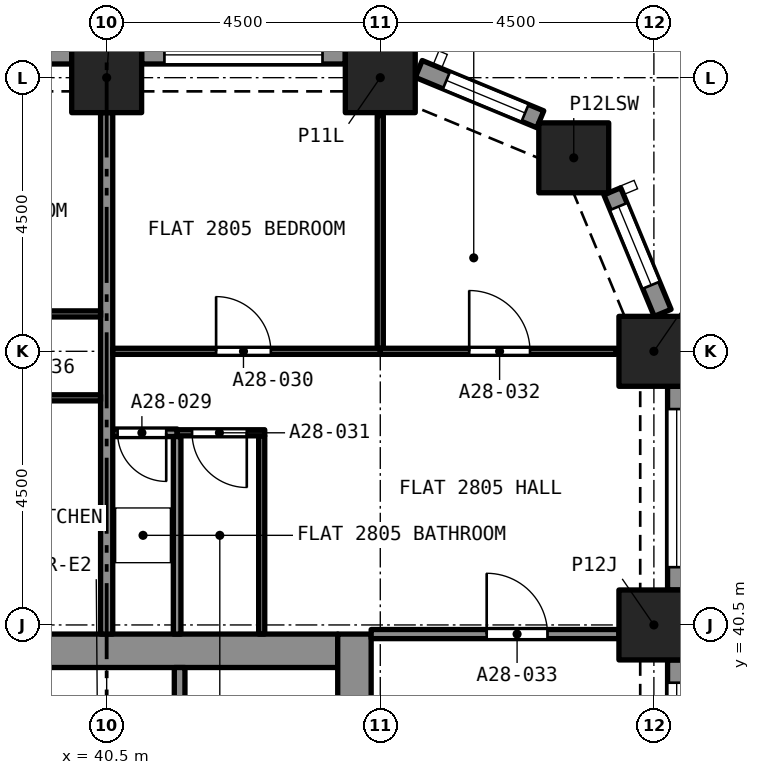
"""IFC4 building model, lengths in metres.
Left out: names, types, materials, properties, quantities, classifications, styles, units other than length and angle.
Written with IfcOpenShell. Run it as: python <this file> out.ifc"""

import sys

from ifc_helpers import new_model, si_unit, direction, frame, frame_2d, origin, origin_2d, place, context, subcontext, project, spatial, rectangle, extrude, element, fill, save


model = new_model("IFC4")
c1 = context("Model", 3, precision=1e-05, world=origin(), true_north=direction((0.0, 1.0)))
c2 = subcontext(c1, "Body", "Model", "MODEL_VIEW")
j1 = project(units=[si_unit("LENGTHUNIT", "METRE"), si_unit("PLANEANGLEUNIT", "RADIAN")], contexts=[c1])
p1 = place(None, origin())
s1 = spatial("IfcSite", under=j1, at=p1, CompositionType="ELEMENT")
p2 = place(p1, origin())
s2 = spatial("IfcBuilding", under=s1, at=p2, CompositionType="ELEMENT")
p3 = place(p2, frame((0.0, 0.0, 102.4)))
s3 = spatial("IfcBuildingStorey", under=s2, at=p3, CompositionType="ELEMENT", Elevation=102.4)
for number, where, z_axis, x_axis in (
    (1, (49.5, 40.5, 0.0), (0.0, 0.0, 1.0), (1.0, 0.0, 0.0)),
    (2, (49.5, 45.0, 0.0), (0.0, 0.0, 1.0), (1.0, 0.0, 0.0)),
    (3, (48.182, 48.182, 0.0), (0.0, 0.0, 1.0), (1.0, 0.0, 0.0)),
    (4, (40.5, 49.5, 0.0), (0.0, 0.0, 1.0), (1.0, 0.0, 0.0)),
    (5, (45.0, 49.5, 0.0), (0.0, 0.0, 1.0), (1.0, 0.0, 0.0)),
):
    element("IfcColumn", number, at=place(p3, frame(where, z_axis=z_axis, x_axis=x_axis)), inside=s3, PredefinedType="COLUMN", context=c2, shape_type="SweptSolid", body=[
        extrude(rectangle(XDim=1.15, YDim=1.15, at=origin_2d()), origin(), (0.0, 0.0, 1.0), 3.2),
    ])
p4 = place(p3, frame((36.7, 40.075, 0.0), z_axis=(0.0, 0.0, 1.0), x_axis=(1.0, 0.0, 0.0)))
e6 = element("IfcWall", 6, at=p4, inside=s3, PredefinedType="SOLIDWALL", context=c2, shape_type="SweptSolid", body=[
    extrude(rectangle(XDim=7.6, YDim=0.55, at=frame_2d((3.8, 0.0))), origin(), (0.0, 0.0, 1.0), 3.2),
])
p5 = place(p3, frame((44.575, 27.15, 0.0), z_axis=(0.0, 0.0, 1.0), x_axis=(0.0, 1.0, 0.0)))
e7 = element("IfcWall", 7, at=p5, inside=s3, PredefinedType="SOLIDWALL", context=c2, shape_type="SweptSolid", body=[
    extrude(rectangle(XDim=13.2, YDim=0.55, at=frame_2d((6.6, 0.0))), origin(), (0.0, 0.0, 1.0), 3.2),
])
p6 = place(p5, frame((8.8, 0.0, 0.0)))
e8 = element("IfcOpeningElement", 8, at=p6, cuts=e7, PredefinedType="OPENING", context=c2, shape_type="SweptSolid", body=[
    extrude(rectangle(XDim=1.2, YDim=2.1, at=frame_2d((0.6, 1.05))), frame((0.0, 0.285, 0.0), z_axis=(0.0, -1.0, 0.0), x_axis=(1.0, 0.0, 0.0)), (0.0, 0.0, 1.0), 0.57),
])
p7 = place(p3, frame((49.875, 39.925, 0.0), z_axis=(0.0, 0.0, 1.0), x_axis=(0.0, -1.0, 0.0)))
e9 = element("IfcWall", 9, at=p7, inside=s3, PredefinedType="SOLIDWALL", context=c2, shape_type="SweptSolid", body=[
    extrude(rectangle(XDim=3.35, YDim=0.3, at=frame_2d((1.675, 0.0))), origin(), (0.0, 0.0, 1.0), 3.2),
])
p8 = place(p7, frame((0.375, 0.0, 0.45)))
e10 = element("IfcOpeningElement", 10, at=p8, cuts=e9, PredefinedType="OPENING", context=c2, shape_type="SweptSolid", body=[
    extrude(rectangle(XDim=2.6, YDim=1.95, at=frame_2d((1.3, 0.975))), frame((0.0, 0.16, 0.0), z_axis=(0.0, -1.0, 0.0), x_axis=(1.0, 0.0, 0.0)), (0.0, 0.0, 1.0), 0.32),
])
p9 = place(p3, frame((49.875, 44.425, 0.0), z_axis=(0.0, 0.0, 1.0), x_axis=(0.0, -1.0, 0.0)))
e11 = element("IfcWall", 11, at=p9, inside=s3, PredefinedType="SOLIDWALL", context=c2, shape_type="SweptSolid", body=[
    extrude(rectangle(XDim=3.35, YDim=0.3, at=frame_2d((1.675, 0.0))), origin(), (0.0, 0.0, 1.0), 3.2),
])
p10 = place(p9, frame((0.375, 0.0, 0.45)))
e12 = element("IfcOpeningElement", 12, at=p10, cuts=e11, PredefinedType="OPENING", context=c2, shape_type="SweptSolid", body=[
    extrude(rectangle(XDim=2.6, YDim=1.95, at=frame_2d((1.3, 0.975))), frame((0.0, 0.16, 0.0), z_axis=(0.0, -1.0, 0.0), x_axis=(1.0, 0.0, 0.0)), (0.0, 0.0, 1.0), 0.32),
])
p11 = place(p3, frame((48.816, 47.631, 0.0), z_axis=(0.0, 0.0, 1.0), x_axis=(0.382723818695, -0.923862802911, 0.0)))
e13 = element("IfcWall", 13, at=p11, inside=s3, PredefinedType="SOLIDWALL", context=c2, shape_type="SweptSolid", body=[
    extrude(rectangle(XDim=2.164, YDim=0.3, at=frame_2d((1.082, 0.0))), origin(), (0.0, 0.0, 1.0), 3.2),
])
p12 = place(p11, frame((0.271, 0.0, 0.45)))
e14 = element("IfcOpeningElement", 14, at=p12, cuts=e13, PredefinedType="OPENING", context=c2, shape_type="SweptSolid", body=[
    extrude(rectangle(XDim=1.4, YDim=1.95, at=frame_2d((0.7, 0.975))), frame((0.0, 0.16, 0.0), z_axis=(0.0, -1.0, 0.0), x_axis=(1.0, 0.0, 0.0)), (0.0, 0.0, 1.0), 0.32),
])
p13 = place(p3, frame((45.632, 49.644, 0.0), z_axis=(0.0, 0.0, 1.0), x_axis=(0.923862802911, -0.382723818695, 0.0)))
e15 = element("IfcWall", 15, at=p13, inside=s3, PredefinedType="SOLIDWALL", context=c2, shape_type="SweptSolid", body=[
    extrude(rectangle(XDim=2.164, YDim=0.3, at=frame_2d((1.082, 0.0))), origin(), (0.0, 0.0, 1.0), 3.2),
])
p14 = place(p13, frame((0.493, 0.0, 0.45)))
e16 = element("IfcOpeningElement", 16, at=p14, cuts=e15, PredefinedType="OPENING", context=c2, shape_type="SweptSolid", body=[
    extrude(rectangle(XDim=1.4, YDim=1.95, at=frame_2d((0.7, 0.975))), frame((0.0, 0.16, 0.0), z_axis=(0.0, -1.0, 0.0), x_axis=(1.0, 0.0, 0.0)), (0.0, 0.0, 1.0), 0.32),
])
p15 = place(p3, frame((41.075, 49.875, 0.0), z_axis=(0.0, 0.0, 1.0), x_axis=(1.0, 0.0, 0.0)))
e17 = element("IfcWall", 17, at=p15, inside=s3, PredefinedType="SOLIDWALL", context=c2, shape_type="SweptSolid", body=[
    extrude(rectangle(XDim=3.35, YDim=0.3, at=frame_2d((1.675, 0.0))), origin(), (0.0, 0.0, 1.0), 3.2),
])
p16 = place(p15, frame((0.375, 0.0, 0.45)))
e18 = element("IfcOpeningElement", 18, at=p16, cuts=e17, PredefinedType="OPENING", context=c2, shape_type="SweptSolid", body=[
    extrude(rectangle(XDim=2.6, YDim=1.95, at=frame_2d((1.3, 0.975))), frame((0.0, 0.16, 0.0), z_axis=(0.0, -1.0, 0.0), x_axis=(1.0, 0.0, 0.0)), (0.0, 0.0, 1.0), 0.32),
])
p17 = place(p3, frame((36.575, 49.875, 0.0), z_axis=(0.0, 0.0, 1.0), x_axis=(1.0, 0.0, 0.0)))
e19 = element("IfcWall", 19, at=p17, inside=s3, PredefinedType="SOLIDWALL", context=c2, shape_type="SweptSolid", body=[
    extrude(rectangle(XDim=3.35, YDim=0.3, at=frame_2d((1.675, 0.0))), origin(), (0.0, 0.0, 1.0), 3.2),
])
p18 = place(p17, frame((0.375, 0.0, 0.45)))
e20 = element("IfcOpeningElement", 20, at=p18, cuts=e19, PredefinedType="OPENING", context=c2, shape_type="SweptSolid", body=[
    extrude(rectangle(XDim=2.6, YDim=1.95, at=frame_2d((1.3, 0.975))), frame((0.0, 0.16, 0.0), z_axis=(0.0, -1.0, 0.0), x_axis=(1.0, 0.0, 0.0)), (0.0, 0.0, 1.0), 0.32),
])
p19 = place(p3, frame((41.659, 43.66, 0.0), z_axis=(0.0, 0.0, 1.0), x_axis=(-1.0, 0.0, 0.0)))
e21 = element("IfcWall", 21, at=p19, inside=s3, PredefinedType="PARTITIONING", context=c2, shape_type="SweptSolid", body=[
    extrude(rectangle(XDim=1.059, YDim=0.125, at=frame_2d((0.53, 0.0))), origin(), (0.0, 0.0, 1.0), 2.9),
])
p20 = place(p19, frame((0.179, 0.0, 0.0)))
e22 = element("IfcOpeningElement", 22, at=p20, cuts=e21, PredefinedType="OPENING", context=c2, shape_type="SweptSolid", body=[
    extrude(rectangle(XDim=0.8, YDim=2.1, at=frame_2d((0.4, 1.05))), frame((0.0, 0.073, 0.0), z_axis=(0.0, -1.0, 0.0), x_axis=(1.0, 0.0, 0.0)), (0.0, 0.0, 1.0), 0.145),
])
p21 = place(p3, frame((41.659, 40.35, 0.0), z_axis=(0.0, 0.0, 1.0), x_axis=(0.0, 1.0, 0.0)))
e23 = element("IfcWall", 23, at=p21, inside=s3, PredefinedType="PARTITIONING", context=c2, shape_type="SweptSolid", body=[
    extrude(rectangle(XDim=3.247, YDim=0.125, at=frame_2d((1.624, 0.0))), origin(), (0.0, 0.0, 1.0), 2.9),
])
p22 = place(p3, frame((40.5, 40.35, 0.0), z_axis=(0.0, 0.0, 1.0), x_axis=(0.0, 1.0, 0.0)))
e24 = element("IfcWall", 24, at=p22, inside=s3, PredefinedType="PARTITIONING", context=c2, shape_type="SweptSolid", body=[
    extrude(rectangle(XDim=8.575, YDim=0.2, at=frame_2d((4.288, 0.0))), origin(), (0.0, 0.0, 1.0), 2.9),
])
p23 = place(p3, frame((40.6, 45.0, 0.0), z_axis=(0.0, 0.0, 1.0), x_axis=(1.0, 0.0, 0.0)))
e25 = element("IfcWall", 25, at=p23, inside=s3, PredefinedType="PARTITIONING", context=c2, shape_type="SweptSolid", body=[
    extrude(rectangle(XDim=4.4, YDim=0.1, at=frame_2d((2.2, 0.0))), origin(), (0.0, 0.0, 1.0), 2.9),
])
p24 = place(p23, frame((1.7, 0.0, 0.0)))
e26 = element("IfcOpeningElement", 26, at=p24, cuts=e25, PredefinedType="OPENING", context=c2, shape_type="SweptSolid", body=[
    extrude(rectangle(XDim=0.9, YDim=2.1, at=frame_2d((0.45, 1.05))), frame((0.0, 0.06, 0.0), z_axis=(0.0, -1.0, 0.0), x_axis=(1.0, 0.0, 0.0)), (0.0, 0.0, 1.0), 0.12),
])
p25 = place(p3, frame((45.0, 45.05, 0.0), z_axis=(0.0, 0.0, 1.0), x_axis=(0.0, 1.0, 0.0)))
e27 = element("IfcWall", 27, at=p25, inside=s3, PredefinedType="PARTITIONING", context=c2, shape_type="SweptSolid", body=[
    extrude(rectangle(XDim=3.828, YDim=0.1, at=frame_2d((1.914, 0.0))), origin(), (0.0, 0.0, 1.0), 2.9),
])
p26 = place(p3, frame((43.05, 40.35, 0.0), z_axis=(0.0, 0.0, 1.0), x_axis=(0.0, 1.0, 0.0)))
e28 = element("IfcWall", 28, at=p26, inside=s3, PredefinedType="PARTITIONING", context=c2, shape_type="SweptSolid", body=[
    extrude(rectangle(XDim=3.26, YDim=0.1, at=frame_2d((1.63, 0.0))), origin(), (0.0, 0.0, 1.0), 2.9),
])
p27 = place(p3, frame((43.1, 43.66, 0.0), z_axis=(0.0, 0.0, 1.0), x_axis=(-1.0, 0.0, 0.0)))
e29 = element("IfcWall", 29, at=p27, inside=s3, PredefinedType="PARTITIONING", context=c2, shape_type="SweptSolid", body=[
    extrude(rectangle(XDim=1.441, YDim=0.1, at=frame_2d((0.72, 0.0))), origin(), (0.0, 0.0, 1.0), 2.9),
])
p28 = place(p27, frame((0.295, 0.0, 0.0)))
e30 = element("IfcOpeningElement", 30, at=p28, cuts=e29, PredefinedType="OPENING", context=c2, shape_type="SweptSolid", body=[
    extrude(rectangle(XDim=0.9, YDim=2.1, at=frame_2d((0.45, 1.05))), frame((0.0, 0.06, 0.0), z_axis=(0.0, -1.0, 0.0), x_axis=(1.0, 0.0, 0.0)), (0.0, 0.0, 1.0), 0.12),
])
p29 = place(p3, frame((45.0, 45.0, 0.0), z_axis=(0.0, 0.0, 1.0), x_axis=(1.0, 0.0, 0.0)))
e31 = element("IfcWall", 31, at=p29, inside=s3, PredefinedType="PARTITIONING", context=c2, shape_type="SweptSolid", body=[
    extrude(rectangle(XDim=3.878, YDim=0.1, at=frame_2d((1.939, 0.0))), origin(), (0.0, 0.0, 1.0), 2.9),
])
p30 = place(p29, frame((1.462, 0.0, 0.0)))
e32 = element("IfcOpeningElement", 32, at=p30, cuts=e31, PredefinedType="OPENING", context=c2, shape_type="SweptSolid", body=[
    extrude(rectangle(XDim=1.0, YDim=2.1, at=frame_2d((0.5, 1.05))), frame((0.0, 0.06, 0.0), z_axis=(0.0, -1.0, 0.0), x_axis=(1.0, 0.0, 0.0)), (0.0, 0.0, 1.0), 0.12),
])
p31 = place(p3, frame((44.85, 40.35, 0.0), z_axis=(0.0, 0.0, 1.0), x_axis=(1.0, 0.0, 0.0)))
e33 = element("IfcWall", 33, at=p31, inside=s3, PredefinedType="PARTITIONING", context=c2, shape_type="SweptSolid", body=[
    extrude(rectangle(XDim=4.075, YDim=0.15, at=frame_2d((2.038, 0.0))), origin(), (0.0, 0.0, 1.0), 2.9),
])
p32 = place(p31, frame((1.9, 0.0, 0.0)))
e34 = element("IfcOpeningElement", 34, at=p32, cuts=e33, PredefinedType="OPENING", context=c2, shape_type="SweptSolid", body=[
    extrude(rectangle(XDim=1.0, YDim=2.1, at=frame_2d((0.5, 1.05))), frame((0.0, 0.085, 0.0), z_axis=(0.0, -1.0, 0.0), x_axis=(1.0, 0.0, 0.0)), (0.0, 0.0, 1.0), 0.17),
])
p33 = place(p3, frame((36.0, 45.615, 0.0), z_axis=(0.0, 0.0, 1.0), x_axis=(1.0, 0.0, 0.0)))
e35 = element("IfcWall", 35, at=p33, inside=s3, PredefinedType="PARTITIONING", context=c2, shape_type="SweptSolid", body=[
    extrude(rectangle(XDim=4.4, YDim=0.1, at=frame_2d((2.2, 0.0))), origin(), (0.0, 0.0, 1.0), 2.9),
])
p34 = place(p33, frame((1.8, 0.0, 0.0)))
e36 = element("IfcOpeningElement", 36, at=p34, cuts=e35, PredefinedType="OPENING", context=c2, shape_type="SweptSolid", body=[
    extrude(rectangle(XDim=0.9, YDim=2.1, at=frame_2d((0.45, 1.05))), frame((0.0, 0.06, 0.0), z_axis=(0.0, -1.0, 0.0), x_axis=(1.0, 0.0, 0.0)), (0.0, 0.0, 1.0), 0.12),
])
p35 = place(p3, frame((40.4, 44.235, 0.0), z_axis=(0.0, 0.0, 1.0), x_axis=(-1.0, 0.0, 0.0)))
e37 = element("IfcWall", 37, at=p35, inside=s3, PredefinedType="PARTITIONING", context=c2, shape_type="SweptSolid", body=[
    extrude(rectangle(XDim=3.25, YDim=0.1, at=frame_2d((1.625, 0.0))), origin(), (0.0, 0.0, 1.0), 2.9),
])
p36 = place(p35, frame((1.125, 0.0, 0.0)))
e38 = element("IfcOpeningElement", 38, at=p36, cuts=e37, PredefinedType="OPENING", context=c2, shape_type="SweptSolid", body=[
    extrude(rectangle(XDim=0.9, YDim=2.1, at=frame_2d((0.45, 1.05))), frame((0.0, 0.06, 0.0), z_axis=(0.0, -1.0, 0.0), x_axis=(1.0, 0.0, 0.0)), (0.0, 0.0, 1.0), 0.12),
])
p37 = place(p3, frame((41.7, 37.5, 0.0), z_axis=(0.0, 0.0, 1.0), x_axis=(0.0, 1.0, 0.0)))
e39 = element("IfcWall", 39, at=p37, inside=s3, PredefinedType="SOLIDWALL", context=c2, shape_type="SweptSolid", body=[
    extrude(rectangle(XDim=2.3, YDim=0.175, at=frame_2d((1.15, 0.0))), origin(), (0.0, 0.0, 1.0), 2.9),
])
p38 = place(p8, origin())
e40 = element("IfcWindow", 40, at=p38, inside=s3, PartitioningType="SINGLE_PANEL", PredefinedType="WINDOW", context=c2, shape_type="SweptSolid", body=[
    extrude(rectangle(XDim=2.6, YDim=1.95, at=frame_2d((1.3, 0.975))), frame((0.0, 0.03, 0.0), z_axis=(0.0, -1.0, 0.0), x_axis=(1.0, 0.0, 0.0)), (0.0, 0.0, 1.0), 0.06),
])
fill(e10, e40)
p39 = place(p10, origin())
e41 = element("IfcWindow", 41, at=p39, inside=s3, PartitioningType="SINGLE_PANEL", PredefinedType="WINDOW", context=c2, shape_type="SweptSolid", body=[
    extrude(rectangle(XDim=2.6, YDim=1.95, at=frame_2d((1.3, 0.975))), frame((0.0, 0.03, 0.0), z_axis=(0.0, -1.0, 0.0), x_axis=(1.0, 0.0, 0.0)), (0.0, 0.0, 1.0), 0.06),
])
fill(e12, e41)
p40 = place(p12, origin())
e42 = element("IfcWindow", 42, at=p40, inside=s3, PartitioningType="SINGLE_PANEL", PredefinedType="WINDOW", context=c2, shape_type="SweptSolid", body=[
    extrude(rectangle(XDim=1.4, YDim=1.95, at=frame_2d((0.7, 0.975))), frame((0.0, 0.03, 0.0), z_axis=(0.0, -1.0, 0.0), x_axis=(1.0, 0.0, 0.0)), (0.0, 0.0, 1.0), 0.06),
])
fill(e14, e42)
p41 = place(p14, origin())
e43 = element("IfcWindow", 43, at=p41, inside=s3, PartitioningType="SINGLE_PANEL", PredefinedType="WINDOW", context=c2, shape_type="SweptSolid", body=[
    extrude(rectangle(XDim=1.4, YDim=1.95, at=frame_2d((0.7, 0.975))), frame((0.0, 0.03, 0.0), z_axis=(0.0, -1.0, 0.0), x_axis=(1.0, 0.0, 0.0)), (0.0, 0.0, 1.0), 0.06),
])
fill(e16, e43)
p42 = place(p16, origin())
e44 = element("IfcWindow", 44, at=p42, inside=s3, PartitioningType="SINGLE_PANEL", PredefinedType="WINDOW", context=c2, shape_type="SweptSolid", body=[
    extrude(rectangle(XDim=2.6, YDim=1.95, at=frame_2d((1.3, 0.975))), frame((0.0, 0.03, 0.0), z_axis=(0.0, -1.0, 0.0), x_axis=(1.0, 0.0, 0.0)), (0.0, 0.0, 1.0), 0.06),
])
fill(e18, e44)
p43 = place(p20, origin())
e45 = element("IfcDoor", 45, at=p43, inside=s3, OperationType="SINGLE_SWING_RIGHT", PredefinedType="DOOR", context=c2, shape_type="SweptSolid", body=[
    extrude(rectangle(XDim=0.8, YDim=2.1, at=frame_2d((0.4, 1.05))), frame((0.0, 0.025, 0.0), z_axis=(0.0, -1.0, 0.0), x_axis=(1.0, 0.0, 0.0)), (0.0, 0.0, 1.0), 0.05),
])
fill(e22, e45)
p44 = place(p24, origin())
e46 = element("IfcDoor", 46, at=p44, inside=s3, OperationType="SINGLE_SWING_LEFT", PredefinedType="DOOR", context=c2, shape_type="SweptSolid", body=[
    extrude(rectangle(XDim=0.9, YDim=2.1, at=frame_2d((0.45, 1.05))), frame((0.0, 0.025, 0.0), z_axis=(0.0, -1.0, 0.0), x_axis=(1.0, 0.0, 0.0)), (0.0, 0.0, 1.0), 0.05),
])
fill(e26, e46)
p45 = place(p28, origin())
e47 = element("IfcDoor", 47, at=p45, inside=s3, OperationType="SINGLE_SWING_RIGHT", PredefinedType="DOOR", context=c2, shape_type="SweptSolid", body=[
    extrude(rectangle(XDim=0.9, YDim=2.1, at=frame_2d((0.45, 1.05))), frame((0.0, 0.025, 0.0), z_axis=(0.0, -1.0, 0.0), x_axis=(1.0, 0.0, 0.0)), (0.0, 0.0, 1.0), 0.05),
])
fill(e30, e47)
p46 = place(p30, origin())
e48 = element("IfcDoor", 48, at=p46, inside=s3, OperationType="SINGLE_SWING_RIGHT", PredefinedType="DOOR", context=c2, shape_type="SweptSolid", body=[
    extrude(rectangle(XDim=1.0, YDim=2.1, at=frame_2d((0.5, 1.05))), frame((0.0, 0.025, 0.0), z_axis=(0.0, -1.0, 0.0), x_axis=(1.0, 0.0, 0.0)), (0.0, 0.0, 1.0), 0.05),
])
fill(e32, e48)
p47 = place(p32, origin())
e49 = element("IfcDoor", 49, at=p47, inside=s3, OperationType="SINGLE_SWING_RIGHT", PredefinedType="DOOR", context=c2, shape_type="SweptSolid", body=[
    extrude(rectangle(XDim=1.0, YDim=2.1, at=frame_2d((0.5, 1.05))), frame((0.0, 0.025, 0.0), z_axis=(0.0, -1.0, 0.0), x_axis=(1.0, 0.0, 0.0)), (0.0, 0.0, 1.0), 0.05),
])
fill(e34, e49)
save(model, sys.argv[1])
